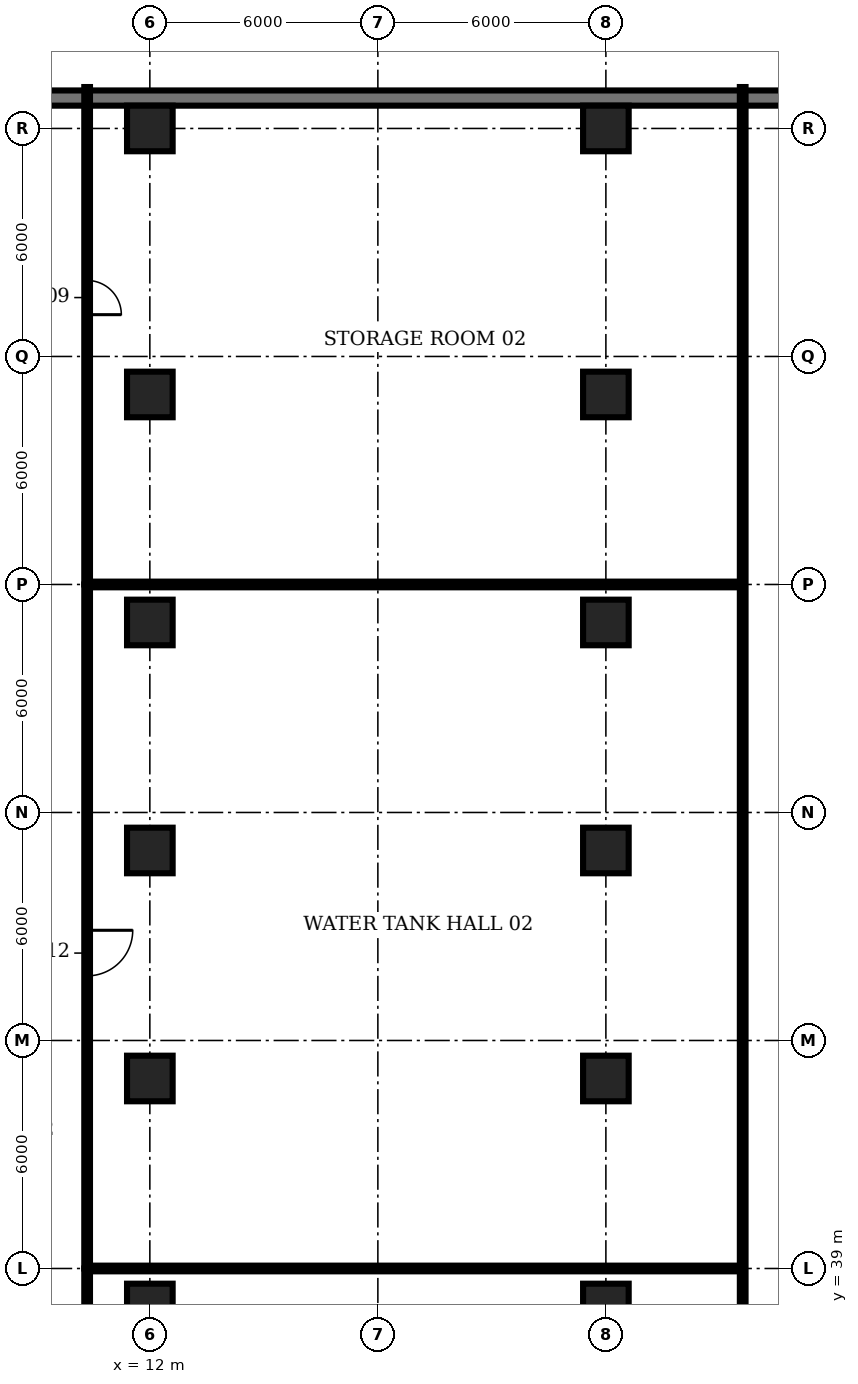
"""IFC4 building model, lengths in metres.
Left out: names, types, materials, properties, quantities, classifications, styles, units other than length and angle.
Written with IfcOpenShell. Run it as: python <this file> out.ifc"""

import sys

from ifc_helpers import new_model, si_unit, direction, frame, frame_2d, origin, origin_2d, place, context, subcontext, project, spatial, rectangle, extrude, element, fill, save


model = new_model("IFC4")
c1 = context("Model", 3, precision=1e-05, world=origin(), true_north=direction((0.0, 1.0)))
c2 = subcontext(c1, "Body", "Model", "MODEL_VIEW")
j1 = project(units=[si_unit("LENGTHUNIT", "METRE"), si_unit("PLANEANGLEUNIT", "RADIAN")], contexts=[c1])
p1 = place(None, origin())
s1 = spatial("IfcSite", under=j1, at=p1, CompositionType="ELEMENT")
p2 = place(p1, origin())
s2 = spatial("IfcBuilding", under=s1, at=p2, CompositionType="ELEMENT")
p3 = place(p2, frame((0.0, 0.0, -6.0)))
s3 = spatial("IfcBuildingStorey", under=s2, at=p3, CompositionType="ELEMENT", Elevation=-6.0)
for number, where, z_axis, x_axis in (
    (1, (12.0, 38.0, -0.3), (0.0, 0.0, 1.0), (1.0, 0.0, 0.0)),
    (2, (12.0, 44.0, -0.3), (0.0, 0.0, 1.0), (1.0, 0.0, 0.0)),
    (3, (12.0, 50.0, -0.3), (0.0, 0.0, 1.0), (1.0, 0.0, 0.0)),
    (4, (12.0, 56.0, -0.3), (0.0, 0.0, 1.0), (1.0, 0.0, 0.0)),
    (5, (12.0, 62.0, -0.3), (0.0, 0.0, 1.0), (1.0, 0.0, 0.0)),
    (6, (12.0, 69.0, -0.3), (0.0, 0.0, 1.0), (1.0, 0.0, 0.0)),
    (7, (24.0, 38.0, -0.3), (0.0, 0.0, 1.0), (1.0, 0.0, 0.0)),
    (8, (24.0, 44.0, -0.3), (0.0, 0.0, 1.0), (1.0, 0.0, 0.0)),
    (9, (24.0, 50.0, -0.3), (0.0, 0.0, 1.0), (1.0, 0.0, 0.0)),
    (10, (24.0, 56.0, -0.3), (0.0, 0.0, 1.0), (1.0, 0.0, 0.0)),
    (11, (24.0, 62.0, -0.3), (0.0, 0.0, 1.0), (1.0, 0.0, 0.0)),
    (12, (24.0, 69.0, -0.3), (0.0, 0.0, 1.0), (1.0, 0.0, 0.0)),
):
    element("IfcColumn", number, at=place(p3, frame(where, z_axis=z_axis, x_axis=x_axis)), inside=s3, PredefinedType="COLUMN", context=c2, shape_type="SweptSolid", body=[
        extrude(rectangle(XDim=1.2, YDim=1.2, at=origin_2d()), origin(), (0.0, 0.0, 1.0), 5.95),
    ])
p4 = place(p3, frame((90.249, 69.8, 0.0), z_axis=(0.0, 0.0, 1.0), x_axis=(-1.0, 0.0, 0.0)))
e13 = element("IfcWall", 13, at=p4, inside=s3, PredefinedType="SOLIDWALL", context=c2, shape_type="SweptSolid", body=[
    extrude(rectangle(XDim=90.497, YDim=0.4, at=frame_2d((45.249, 0.0))), origin(), (0.0, 0.0, 1.0), 5.65),
])
p5 = place(p3, frame((10.35, 39.0, 0.0), z_axis=(0.0, 0.0, 1.0), x_axis=(0.0, -1.0, 0.0)))
e14 = element("IfcWall", 14, at=p5, inside=s3, PredefinedType="PARTITIONING", context=c2, shape_type="SweptSolid", body=[
    extrude(rectangle(XDim=4.6, YDim=0.15, at=frame_2d((2.3, 0.0))), origin(), (0.0, 0.0, 1.0), 4.7),
])
p6 = place(p5, frame((3.2, 0.0, 0.0)))
e15 = element("IfcOpeningElement", 15, at=p6, cuts=e14, PredefinedType="OPENING", context=c2, shape_type="SweptSolid", body=[
    extrude(rectangle(XDim=1.2, YDim=2.1, at=frame_2d((0.6, 1.05))), frame((0.0, 0.085, 0.0), z_axis=(0.0, -1.0, 0.0), x_axis=(1.0, 0.0, 0.0)), (0.0, 0.0, 1.0), 0.17),
])
p7 = place(p3, frame((10.35, 39.0, 0.0), z_axis=(0.0, 0.0, 1.0), x_axis=(1.0, 0.0, 0.0)))
e16 = element("IfcWall", 16, at=p7, inside=s3, PredefinedType="PARTITIONING", context=c2, shape_type="SweptSolid", body=[
    extrude(rectangle(XDim=17.25, YDim=0.15, at=frame_2d((8.625, 0.0))), origin(), (0.0, 0.0, 1.0), 4.7),
])
p8 = place(p3, frame((10.35, 57.0, 0.0), z_axis=(0.0, 0.0, 1.0), x_axis=(0.0, -1.0, 0.0)))
e17 = element("IfcWall", 17, at=p8, inside=s3, PredefinedType="PARTITIONING", context=c2, shape_type="SweptSolid", body=[
    extrude(rectangle(XDim=18.0, YDim=0.15, at=frame_2d((9.0, 0.0))), origin(), (0.0, 0.0, 1.0), 4.7),
])
p9 = place(p8, frame((9.1, 0.0, 0.0)))
e18 = element("IfcOpeningElement", 18, at=p9, cuts=e17, PredefinedType="OPENING", context=c2, shape_type="SweptSolid", body=[
    extrude(rectangle(XDim=1.2, YDim=2.1, at=frame_2d((0.6, 1.05))), frame((0.0, 0.085, 0.0), z_axis=(0.0, -1.0, 0.0), x_axis=(1.0, 0.0, 0.0)), (0.0, 0.0, 1.0), 0.17),
])
p10 = place(p3, frame((10.35, 57.0, 0.0), z_axis=(0.0, 0.0, 1.0), x_axis=(1.0, 0.0, 0.0)))
e19 = element("IfcWall", 19, at=p10, inside=s3, PredefinedType="PARTITIONING", context=c2, shape_type="SweptSolid", body=[
    extrude(rectangle(XDim=17.25, YDim=0.15, at=frame_2d((8.625, 0.0))), origin(), (0.0, 0.0, 1.0), 4.7),
])
p11 = place(p3, frame((10.35, 70.09, 0.0), z_axis=(0.0, 0.0, 1.0), x_axis=(0.0, -1.0, 0.0)))
e20 = element("IfcWall", 20, at=p11, inside=s3, PredefinedType="PARTITIONING", context=c2, shape_type="SweptSolid", body=[
    extrude(rectangle(XDim=13.09, YDim=0.15, at=frame_2d((6.545, 0.0))), origin(), (0.0, 0.0, 1.0), 4.7),
])
p12 = place(p11, frame((5.09, 0.0, 0.0)))
e21 = element("IfcOpeningElement", 21, at=p12, cuts=e20, PredefinedType="OPENING", context=c2, shape_type="SweptSolid", body=[
    extrude(rectangle(XDim=0.9, YDim=2.1, at=frame_2d((0.45, 1.05))), frame((0.0, 0.085, 0.0), z_axis=(0.0, -1.0, 0.0), x_axis=(1.0, 0.0, 0.0)), (0.0, 0.0, 1.0), 0.17),
])
p13 = place(p3, frame((27.6, 24.95, 0.0), z_axis=(0.0, 0.0, 1.0), x_axis=(0.0, 1.0, 0.0)))
e22 = element("IfcWall", 22, at=p13, inside=s3, PredefinedType="PARTITIONING", context=c2, shape_type="SweptSolid", body=[
    extrude(rectangle(XDim=45.14, YDim=0.15, at=frame_2d((22.57, 0.0))), origin(), (0.0, 0.0, 1.0), 4.7),
])
p14 = place(p9, origin())
e23 = element("IfcDoor", 23, at=p14, inside=s3, OperationType="SINGLE_SWING_LEFT", PredefinedType="DOOR", context=c2, shape_type="SweptSolid", body=[
    extrude(rectangle(XDim=1.2, YDim=2.1, at=frame_2d((0.6, 1.05))), frame((0.0, 0.025, 0.0), z_axis=(0.0, -1.0, 0.0), x_axis=(1.0, 0.0, 0.0)), (0.0, 0.0, 1.0), 0.05),
])
fill(e18, e23)
p15 = place(p12, origin())
e24 = element("IfcDoor", 24, at=p15, inside=s3, OperationType="SINGLE_SWING_RIGHT", PredefinedType="DOOR", context=c2, shape_type="SweptSolid", body=[
    extrude(rectangle(XDim=0.9, YDim=2.1, at=frame_2d((0.45, 1.05))), frame((0.0, 0.025, 0.0), z_axis=(0.0, -1.0, 0.0), x_axis=(1.0, 0.0, 0.0)), (0.0, 0.0, 1.0), 0.05),
])
fill(e21, e24)
save(model, sys.argv[1])
